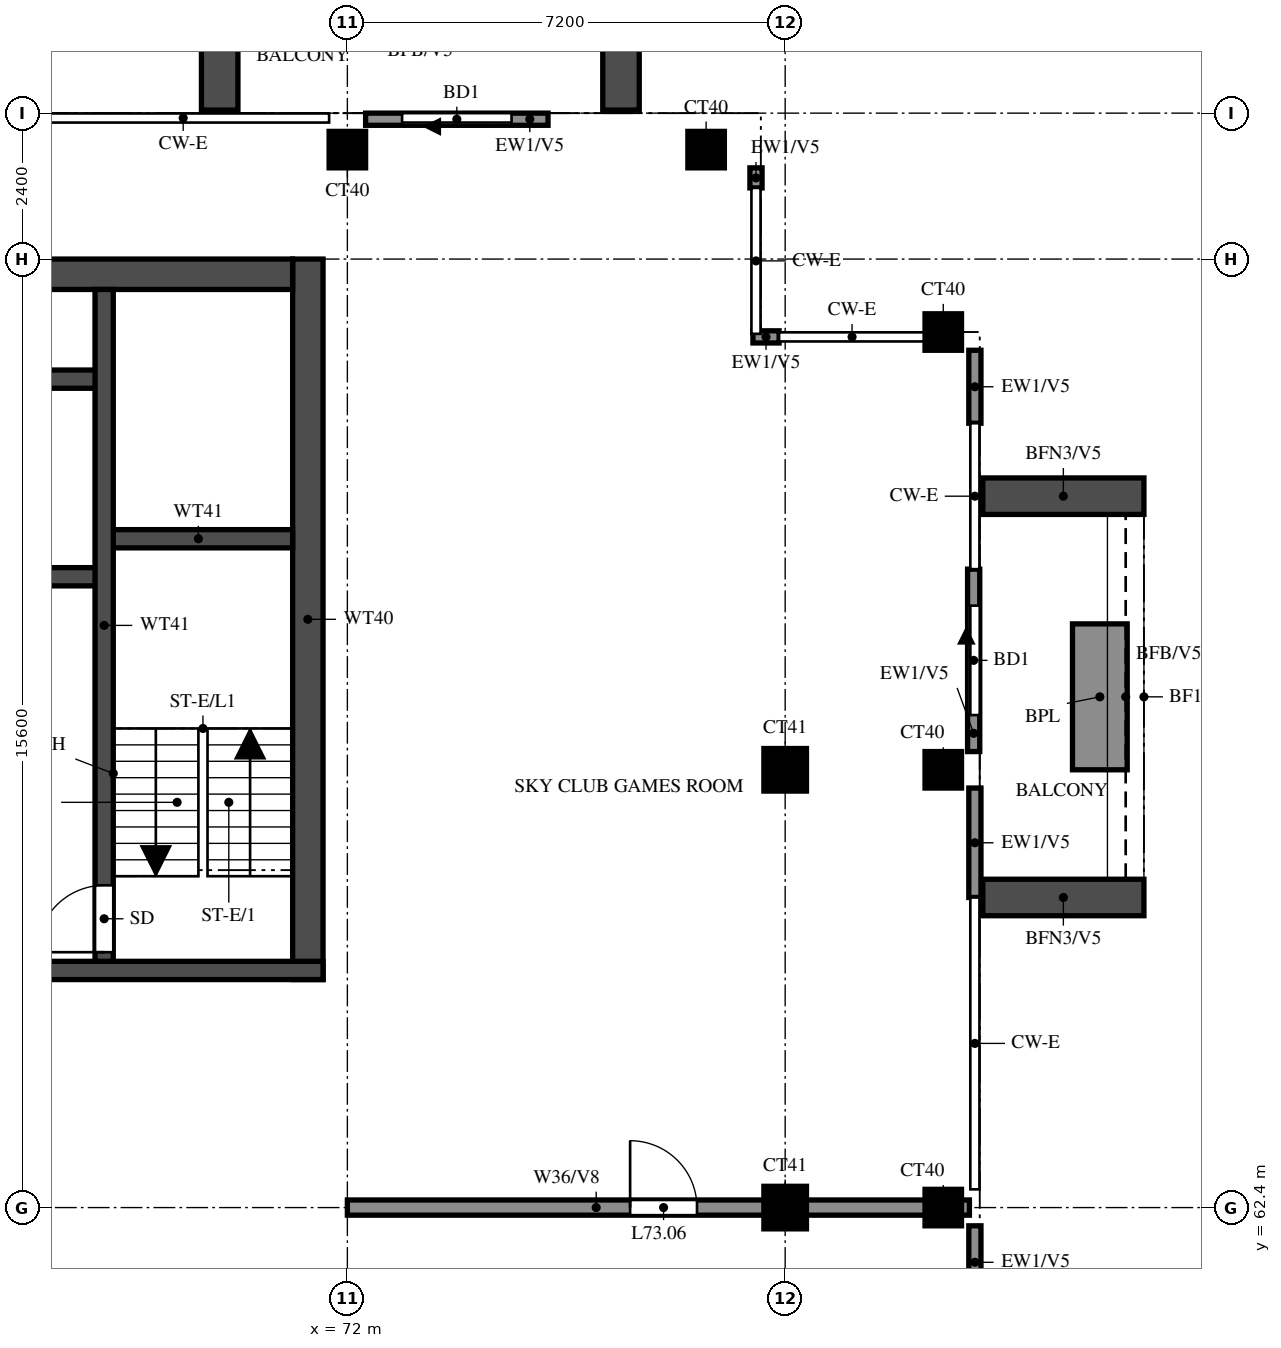
"""IFC4 building model, lengths in metres.
Left out: names, types, materials, properties, quantities, classifications, styles, units other than length and angle.
Written with IfcOpenShell. Run it as: python <this file> out.ifc"""

import sys

from ifc_helpers import new_model, si_unit, direction, frame, frame_2d, origin, origin_2d, place, context, subcontext, project, spatial, rectangle, extrude, source, transform, mapped, element, fill, save


model = new_model("IFC4")
c1 = context("Model", 3, precision=1e-05, world=origin(), true_north=direction((0.0, 1.0)))
c2 = subcontext(c1, "Body", "Model", "MODEL_VIEW")
j1 = project(units=[si_unit("LENGTHUNIT", "METRE"), si_unit("PLANEANGLEUNIT", "RADIAN")], contexts=[c1])
p1 = place(None, origin())
s1 = spatial("IfcSite", under=j1, at=p1, CompositionType="ELEMENT")
p2 = place(p1, origin())
s2 = spatial("IfcBuilding", under=s1, at=p2, CompositionType="ELEMENT")
p3 = place(p2, frame((0.0, 0.0, 271.0)))
s3 = spatial("IfcBuildingStorey", under=s2, at=p3, CompositionType="ELEMENT", Elevation=271.0)
m1 = source(origin(), c2, "Body", "SweptSolid", [
    extrude(rectangle(XDim=0.7, YDim=0.7, at=origin_2d()), origin(), (0.0, 0.0, 1.0), 3.15),
])
p4 = place(p3, frame((79.2, 62.4, 0.0), z_axis=(0.0, 0.0, 1.0), x_axis=(1.0, 0.0, 0.0)))
e1 = element("IfcColumn", 1, at=p4, inside=s3, PredefinedType="COLUMN", context=c2, shape_type="MappedRepresentation", body=[
    mapped(m1, transform((0.0, 0.0, 0.0))),
])
m2 = source(origin(), c2, "Body", "SweptSolid", [
    extrude(rectangle(XDim=0.6, YDim=0.6, at=origin_2d()), origin(), (0.0, 0.0, 1.0), 3.15),
])
p5 = place(p3, frame((81.8, 62.4, 0.0), z_axis=(0.0, 0.0, 1.0), x_axis=(1.0, 0.0, 0.0)))
e2 = element("IfcColumn", 2, at=p5, inside=s3, PredefinedType="COLUMN", context=c2, shape_type="MappedRepresentation", body=[
    mapped(m2, transform((0.0, 0.0, 0.0))),
])
p6 = place(p3, frame((79.2, 69.6, 0.0), z_axis=(0.0, 0.0, 1.0), x_axis=(1.0, 0.0, 0.0)))
e3 = element("IfcColumn", 3, at=p6, inside=s3, PredefinedType="COLUMN", context=c2, shape_type="MappedRepresentation", body=[
    mapped(m1, transform((0.0, 0.0, 0.0))),
])
for number, where, z_axis, x_axis in (
    (4, (81.8, 69.6, 0.0), (0.0, 0.0, 1.0), (1.0, 0.0, 0.0)),
    (5, (81.8, 76.8, 0.0), (0.0, 0.0, 1.0), (1.0, 0.0, 0.0)),
    (6, (72.0, 79.8, 0.0), (0.0, 0.0, 1.0), (1.0, 0.0, 0.0)),
    (7, (77.9, 79.8, 0.0), (0.0, 0.0, 1.0), (1.0, 0.0, 0.0)),
):
    element("IfcColumn", number, at=place(p3, frame(where, z_axis=z_axis, x_axis=x_axis)), inside=s3, PredefinedType="COLUMN", context=c2, shape_type="MappedRepresentation", body=[
        mapped(m2, transform((0.0, 0.0, 0.0))),
    ])
p7 = place(p3, frame((71.35, 66.15, 0.0), z_axis=(0.0, 0.0, 1.0), x_axis=(0.0, 1.0, 0.0)))
e8 = element("IfcWall", 8, at=p7, inside=s3, PredefinedType="SHEAR", context=c2, shape_type="SweptSolid", body=[
    extrude(rectangle(XDim=11.85, YDim=0.5, at=frame_2d((5.925, 0.0))), origin(), (0.0, 0.0, 1.0), 3.15),
])
p8 = place(p3, frame((29.7, 77.75, 0.0), z_axis=(0.0, 0.0, 1.0), x_axis=(1.0, 0.0, 0.0)))
e9 = element("IfcWall", 9, at=p8, inside=s3, PredefinedType="SHEAR", context=c2, shape_type="SweptSolid", body=[
    extrude(rectangle(XDim=41.4, YDim=0.5, at=frame_2d((20.7, 0.0))), origin(), (0.0, 0.0, 1.0), 3.15),
])
p9 = place(p3, frame((29.2, 66.3, 0.0), z_axis=(0.0, 0.0, 1.0), x_axis=(1.0, 0.0, 0.0)))
e10 = element("IfcWall", 10, at=p9, inside=s3, PredefinedType="SHEAR", context=c2, shape_type="SweptSolid", body=[
    extrude(rectangle(XDim=42.4, YDim=0.3, at=frame_2d((21.2, 0.0))), origin(), (0.0, 0.0, 1.0), 3.15),
])
p10 = place(p9, frame((1.425, 0.0, 0.0)))
e11 = element("IfcOpeningElement", 11, at=p10, cuts=e10, PredefinedType="OPENING", context=c2, shape_type="SweptSolid", body=[
    extrude(rectangle(XDim=1.1, YDim=2.1, at=frame_2d((0.55, 1.05))), frame((0.0, 0.16, 0.0), z_axis=(0.0, -1.0, 0.0), x_axis=(1.0, 0.0, 0.0)), (0.0, 0.0, 1.0), 0.32),
])
p11 = place(p9, frame((4.2, 0.0, 0.0)))
e12 = element("IfcOpeningElement", 12, at=p11, cuts=e10, PredefinedType="OPENING", context=c2, shape_type="SweptSolid", body=[
    extrude(rectangle(XDim=1.8, YDim=2.1, at=frame_2d((0.9, 1.05))), frame((0.0, 0.16, 0.0), z_axis=(0.0, -1.0, 0.0), x_axis=(1.0, 0.0, 0.0)), (0.0, 0.0, 1.0), 0.32),
])
p12 = place(p3, frame((32.8, 72.775, 0.0), z_axis=(0.0, 0.0, 1.0), x_axis=(1.0, 0.0, 0.0)))
e13 = element("IfcWall", 13, at=p12, inside=s3, PredefinedType="SHEAR", context=c2, shape_type="SweptSolid", body=[
    extrude(rectangle(XDim=35.2, YDim=0.3, at=frame_2d((17.6, 0.0))), origin(), (0.0, 0.0, 1.0), 3.15),
])
p13 = place(p12, frame((19.8, 0.0, 0.0)))
e14 = element("IfcOpeningElement", 14, at=p13, cuts=e13, PredefinedType="OPENING", context=c2, shape_type="SweptSolid", body=[
    extrude(rectangle(XDim=1.1, YDim=2.1, at=frame_2d((0.55, 1.05))), frame((0.0, 0.16, 0.0), z_axis=(0.0, -1.0, 0.0), x_axis=(1.0, 0.0, 0.0)), (0.0, 0.0, 1.0), 0.32),
])
p14 = place(p12, frame((27.725, 0.0, 0.0)))
e15 = element("IfcOpeningElement", 15, at=p14, cuts=e13, PredefinedType="OPENING", context=c2, shape_type="SweptSolid", body=[
    extrude(rectangle(XDim=1.1, YDim=2.1, at=frame_2d((0.55, 1.05))), frame((0.0, 0.16, 0.0), z_axis=(0.0, -1.0, 0.0), x_axis=(1.0, 0.0, 0.0)), (0.0, 0.0, 1.0), 0.32),
])
p15 = place(p12, frame((30.325, 0.0, 0.0)))
e16 = element("IfcOpeningElement", 16, at=p15, cuts=e13, PredefinedType="OPENING", context=c2, shape_type="SweptSolid", body=[
    extrude(rectangle(XDim=1.1, YDim=2.1, at=frame_2d((0.55, 1.05))), frame((0.0, 0.16, 0.0), z_axis=(0.0, -1.0, 0.0), x_axis=(1.0, 0.0, 0.0)), (0.0, 0.0, 1.0), 0.32),
])
p16 = place(p12, frame((3.825, 0.0, 0.0)))
e17 = element("IfcOpeningElement", 17, at=p16, cuts=e13, PredefinedType="OPENING", context=c2, shape_type="SweptSolid", body=[
    extrude(rectangle(XDim=1.1, YDim=2.1, at=frame_2d((0.55, 1.05))), frame((0.0, 0.16, 0.0), z_axis=(0.0, -1.0, 0.0), x_axis=(1.0, 0.0, 0.0)), (0.0, 0.0, 1.0), 0.32),
])
p17 = place(p12, frame((6.575, 0.0, 0.0)))
e18 = element("IfcOpeningElement", 18, at=p17, cuts=e13, PredefinedType="OPENING", context=c2, shape_type="SweptSolid", body=[
    extrude(rectangle(XDim=1.1, YDim=2.1, at=frame_2d((0.55, 1.05))), frame((0.0, 0.16, 0.0), z_axis=(0.0, -1.0, 0.0), x_axis=(1.0, 0.0, 0.0)), (0.0, 0.0, 1.0), 0.32),
])
p18 = place(p12, frame((9.325, 0.0, 0.0)))
e19 = element("IfcOpeningElement", 19, at=p18, cuts=e13, PredefinedType="OPENING", context=c2, shape_type="SweptSolid", body=[
    extrude(rectangle(XDim=1.1, YDim=2.1, at=frame_2d((0.55, 1.05))), frame((0.0, 0.16, 0.0), z_axis=(0.0, -1.0, 0.0), x_axis=(1.0, 0.0, 0.0)), (0.0, 0.0, 1.0), 0.32),
])
p19 = place(p12, frame((12.075, 0.0, 0.0)))
e20 = element("IfcOpeningElement", 20, at=p19, cuts=e13, PredefinedType="OPENING", context=c2, shape_type="SweptSolid", body=[
    extrude(rectangle(XDim=1.1, YDim=2.1, at=frame_2d((0.55, 1.05))), frame((0.0, 0.16, 0.0), z_axis=(0.0, -1.0, 0.0), x_axis=(1.0, 0.0, 0.0)), (0.0, 0.0, 1.0), 0.32),
])
p20 = place(p12, frame((14.825, 0.0, 0.0)))
e21 = element("IfcOpeningElement", 21, at=p20, cuts=e13, PredefinedType="OPENING", context=c2, shape_type="SweptSolid", body=[
    extrude(rectangle(XDim=1.1, YDim=2.1, at=frame_2d((0.55, 1.05))), frame((0.0, 0.16, 0.0), z_axis=(0.0, -1.0, 0.0), x_axis=(1.0, 0.0, 0.0)), (0.0, 0.0, 1.0), 0.32),
])
p21 = place(p12, frame((17.575, 0.0, 0.0)))
e22 = element("IfcOpeningElement", 22, at=p21, cuts=e13, PredefinedType="OPENING", context=c2, shape_type="SweptSolid", body=[
    extrude(rectangle(XDim=1.1, YDim=2.1, at=frame_2d((0.55, 1.05))), frame((0.0, 0.16, 0.0), z_axis=(0.0, -1.0, 0.0), x_axis=(1.0, 0.0, 0.0)), (0.0, 0.0, 1.0), 0.32),
])
p22 = place(p12, frame((0.95, 0.0, 0.0)))
e23 = element("IfcOpeningElement", 23, at=p22, cuts=e13, PredefinedType="OPENING", context=c2, shape_type="SweptSolid", body=[
    extrude(rectangle(XDim=1.1, YDim=2.1, at=frame_2d((0.55, 1.05))), frame((0.0, 0.16, 0.0), z_axis=(0.0, -1.0, 0.0), x_axis=(1.0, 0.0, 0.0)), (0.0, 0.0, 1.0), 0.32),
])
p23 = place(p3, frame((32.8, 76.025, 0.0), z_axis=(0.0, 0.0, 1.0), x_axis=(1.0, 0.0, 0.0)))
e24 = element("IfcWall", 24, at=p23, inside=s3, PredefinedType="SHEAR", context=c2, shape_type="SweptSolid", body=[
    extrude(rectangle(XDim=35.2, YDim=0.3, at=frame_2d((17.6, 0.0))), origin(), (0.0, 0.0, 1.0), 3.15),
])
p24 = place(p3, frame((68.0, 73.4, 0.0), z_axis=(0.0, 0.0, 1.0), x_axis=(1.0, 0.0, 0.0)))
e25 = element("IfcWall", 25, at=p24, inside=s3, PredefinedType="SHEAR", context=c2, shape_type="SweptSolid", body=[
    extrude(rectangle(XDim=3.1, YDim=0.3, at=frame_2d((1.55, 0.0))), origin(), (0.0, 0.0, 1.0), 3.15),
])
p25 = place(p3, frame((68.0, 66.45, 0.0), z_axis=(0.0, 0.0, 1.0), x_axis=(0.0, 1.0, 0.0)))
e26 = element("IfcWall", 26, at=p25, inside=s3, PredefinedType="SHEAR", context=c2, shape_type="SweptSolid", body=[
    extrude(rectangle(XDim=11.05, YDim=0.3, at=frame_2d((5.525, 0.0))), origin(), (0.0, 0.0, 1.0), 3.15),
])
p26 = place(p25, frame((0.15, 0.0, 0.0)))
e27 = element("IfcOpeningElement", 27, at=p26, cuts=e26, PredefinedType="OPENING", context=c2, shape_type="SweptSolid", body=[
    extrude(rectangle(XDim=1.1, YDim=2.1, at=frame_2d((0.55, 1.05))), frame((0.0, 0.16, 0.0), z_axis=(0.0, -1.0, 0.0), x_axis=(1.0, 0.0, 0.0)), (0.0, 0.0, 1.0), 0.32),
])
p27 = place(p3, frame((82.3, 69.9, 0.0), z_axis=(0.0, 0.0, 1.0), x_axis=(0.0, 1.0, 0.0)))
e28 = element("IfcWall", 28, at=p27, inside=s3, PredefinedType="SOLIDWALL", context=c2, shape_type="SweptSolid", body=[
    extrude(rectangle(XDim=3.0, YDim=0.2, at=frame_2d((1.5, 0.0))), origin(), (0.0, 0.0, 1.0), 3.15),
])
p28 = place(p27, frame((0.6, 0.0, 0.0)))
e29 = element("IfcOpeningElement", 29, at=p28, cuts=e28, PredefinedType="OPENING", context=c2, shape_type="SweptSolid", body=[
    extrude(rectangle(XDim=1.8, YDim=2.4, at=frame_2d((0.9, 1.2))), frame((0.0, 0.11, 0.0), z_axis=(0.0, -1.0, 0.0), x_axis=(1.0, 0.0, 0.0)), (0.0, 0.0, 1.0), 0.22),
])
p29 = place(p3, frame((82.32, 60.9, 0.0), z_axis=(0.0, 0.0, 1.0), x_axis=(0.0, 1.0, 0.0)))
e30 = element("IfcWall", 30, at=p29, inside=s3, PredefinedType="SOLIDWALL", context=c2, shape_type="SweptSolid", body=[
    extrude(rectangle(XDim=1.2, YDim=0.2, at=frame_2d((0.6, 0.0))), origin(), (0.0, 0.0, 1.0), 3.15),
])
p30 = place(p3, frame((82.32, 67.5, 0.0), z_axis=(0.0, 0.0, 1.0), x_axis=(0.0, 1.0, 0.0)))
e31 = element("IfcWall", 31, at=p30, inside=s3, PredefinedType="SOLIDWALL", context=c2, shape_type="SweptSolid", body=[
    extrude(rectangle(XDim=1.8, YDim=0.2, at=frame_2d((0.9, 0.0))), origin(), (0.0, 0.0, 1.0), 3.15),
])
p31 = place(p3, frame((82.32, 75.3, 0.0), z_axis=(0.0, 0.0, 1.0), x_axis=(0.0, 1.0, 0.0)))
e32 = element("IfcWall", 32, at=p31, inside=s3, PredefinedType="SOLIDWALL", context=c2, shape_type="SweptSolid", body=[
    extrude(rectangle(XDim=1.2, YDim=0.2, at=frame_2d((0.6, 0.0))), origin(), (0.0, 0.0, 1.0), 3.15),
])
p32 = place(p3, frame((79.1, 76.72, 0.0), z_axis=(0.0, 0.0, 1.0), x_axis=(-1.0, 0.0, 0.0)))
e33 = element("IfcWall", 33, at=p32, inside=s3, PredefinedType="SOLIDWALL", context=c2, shape_type="SweptSolid", body=[
    extrude(rectangle(XDim=0.43, YDim=0.2, at=frame_2d((0.215, 0.0))), origin(), (0.0, 0.0, 1.0), 3.15),
])
p33 = place(p3, frame((78.72, 79.17, 0.0), z_axis=(0.0, 0.0, 1.0), x_axis=(0.0, 1.0, 0.0)))
e34 = element("IfcWall", 34, at=p33, inside=s3, PredefinedType="SOLIDWALL", context=c2, shape_type="SweptSolid", body=[
    extrude(rectangle(XDim=0.33, YDim=0.2, at=frame_2d((0.165, 0.0))), origin(), (0.0, 0.0, 1.0), 3.15),
])
p34 = place(p3, frame((75.3, 80.3, 0.0), z_axis=(0.0, 0.0, 1.0), x_axis=(-1.0, 0.0, 0.0)))
e35 = element("IfcWall", 35, at=p34, inside=s3, PredefinedType="SOLIDWALL", context=c2, shape_type="SweptSolid", body=[
    extrude(rectangle(XDim=3.0, YDim=0.2, at=frame_2d((1.5, 0.0))), origin(), (0.0, 0.0, 1.0), 3.15),
])
p35 = place(p34, frame((0.6, 0.0, 0.0)))
e36 = element("IfcOpeningElement", 36, at=p35, cuts=e35, PredefinedType="OPENING", context=c2, shape_type="SweptSolid", body=[
    extrude(rectangle(XDim=1.8, YDim=2.4, at=frame_2d((0.9, 1.2))), frame((0.0, 0.11, 0.0), z_axis=(0.0, -1.0, 0.0), x_axis=(1.0, 0.0, 0.0)), (0.0, 0.0, 1.0), 0.22),
])
for number, where, z_axis, x_axis in (
    (37, (82.45, 67.5, 0.0), (0.0, 0.0, 1.0), (1.0, 0.0, 0.0)),
    (38, (82.45, 74.1, 0.0), (0.0, 0.0, 1.0), (1.0, 0.0, 0.0)),
):
    element("IfcWall", number, at=place(p3, frame(where, z_axis=z_axis, x_axis=x_axis)), inside=s3, PredefinedType="SOLIDWALL", context=c2, shape_type="SweptSolid", body=[
        extrude(rectangle(XDim=2.65, YDim=0.6, at=frame_2d((1.325, 0.0))), origin(), (0.0, 0.0, 1.0), 2.901),
    ])
p36 = place(p3, frame((84.375, 69.6, 0.0), z_axis=(0.0, 0.0, 1.0), x_axis=(0.0, 1.0, 0.0)))
e39 = element("IfcWall", 39, at=p36, inside=s3, PredefinedType="SOLIDWALL", context=c2, shape_type="SweptSolid", body=[
    extrude(rectangle(XDim=2.4, YDim=0.9, at=frame_2d((1.2, 0.0))), origin(), (0.0, 0.0, 1.0), 0.9),
])
for number, where, z_axis, x_axis in (
    (40, (76.5, 80.45, 0.0), (0.0, 0.0, 1.0), (0.0, 1.0, 0.0)),
    (41, (69.9, 80.45, 0.0), (0.0, 0.0, 1.0), (0.0, 1.0, 0.0)),
):
    element("IfcWall", number, at=place(p3, frame(where, z_axis=z_axis, x_axis=x_axis)), inside=s3, PredefinedType="SOLIDWALL", context=c2, shape_type="SweptSolid", body=[
        extrude(rectangle(XDim=2.65, YDim=0.6, at=frame_2d((1.325, 0.0))), origin(), (0.0, 0.0, 1.0), 2.901),
    ])
p37 = place(p3, frame((72.0, 62.4, 0.0), z_axis=(0.0, 0.0, 1.0), x_axis=(1.0, 0.0, 0.0)))
e42 = element("IfcWall", 42, at=p37, inside=s3, PredefinedType="SOLIDWALL", context=c2, shape_type="SweptSolid", body=[
    extrude(rectangle(XDim=10.23, YDim=0.25, at=frame_2d((5.115, 0.0))), origin(), (0.0, 0.0, 1.0), 3.15),
])
p38 = place(p37, frame((4.65, 0.0, 0.0)))
e43 = element("IfcOpeningElement", 43, at=p38, cuts=e42, PredefinedType="OPENING", context=c2, shape_type="SweptSolid", body=[
    extrude(rectangle(XDim=1.1, YDim=2.1, at=frame_2d((0.55, 1.05))), frame((0.0, 0.135, 0.0), z_axis=(0.0, -1.0, 0.0), x_axis=(1.0, 0.0, 0.0)), (0.0, 0.0, 1.0), 0.27),
])
p39 = place(p28, origin())
e44 = element("IfcDoor", 44, at=p39, inside=s3, OperationType="DOUBLE_DOOR_SLIDING", PredefinedType="DOOR", context=c2, shape_type="SweptSolid", body=[
    extrude(rectangle(XDim=1.8, YDim=2.4, at=frame_2d((0.9, 1.2))), frame((0.0, 0.025, 0.0), z_axis=(0.0, -1.0, 0.0), x_axis=(1.0, 0.0, 0.0)), (0.0, 0.0, 1.0), 0.05),
])
fill(e29, e44)
p40 = place(p35, origin())
e45 = element("IfcDoor", 45, at=p40, inside=s3, OperationType="DOUBLE_DOOR_SLIDING", PredefinedType="DOOR", context=c2, shape_type="SweptSolid", body=[
    extrude(rectangle(XDim=1.8, YDim=2.4, at=frame_2d((0.9, 1.2))), frame((0.0, 0.025, 0.0), z_axis=(0.0, -1.0, 0.0), x_axis=(1.0, 0.0, 0.0)), (0.0, 0.0, 1.0), 0.05),
])
fill(e36, e45)
p41 = place(p26, origin())
e46 = element("IfcDoor", 46, at=p41, inside=s3, OperationType="SINGLE_SWING_RIGHT", PredefinedType="DOOR", context=c2, shape_type="SweptSolid", body=[
    extrude(rectangle(XDim=1.1, YDim=2.1, at=frame_2d((0.55, 1.05))), frame((0.0, 0.025, 0.0), z_axis=(0.0, -1.0, 0.0), x_axis=(1.0, 0.0, 0.0)), (0.0, 0.0, 1.0), 0.05),
])
fill(e27, e46)
p42 = place(p38, origin())
e47 = element("IfcDoor", 47, at=p42, inside=s3, OperationType="SINGLE_SWING_RIGHT", PredefinedType="DOOR", context=c2, shape_type="SweptSolid", body=[
    extrude(rectangle(XDim=1.1, YDim=2.1, at=frame_2d((0.55, 1.05))), frame((0.0, 0.025, 0.0), z_axis=(0.0, -1.0, 0.0), x_axis=(1.0, 0.0, 0.0)), (0.0, 0.0, 1.0), 0.05),
])
fill(e43, e47)
save(model, sys.argv[1])
